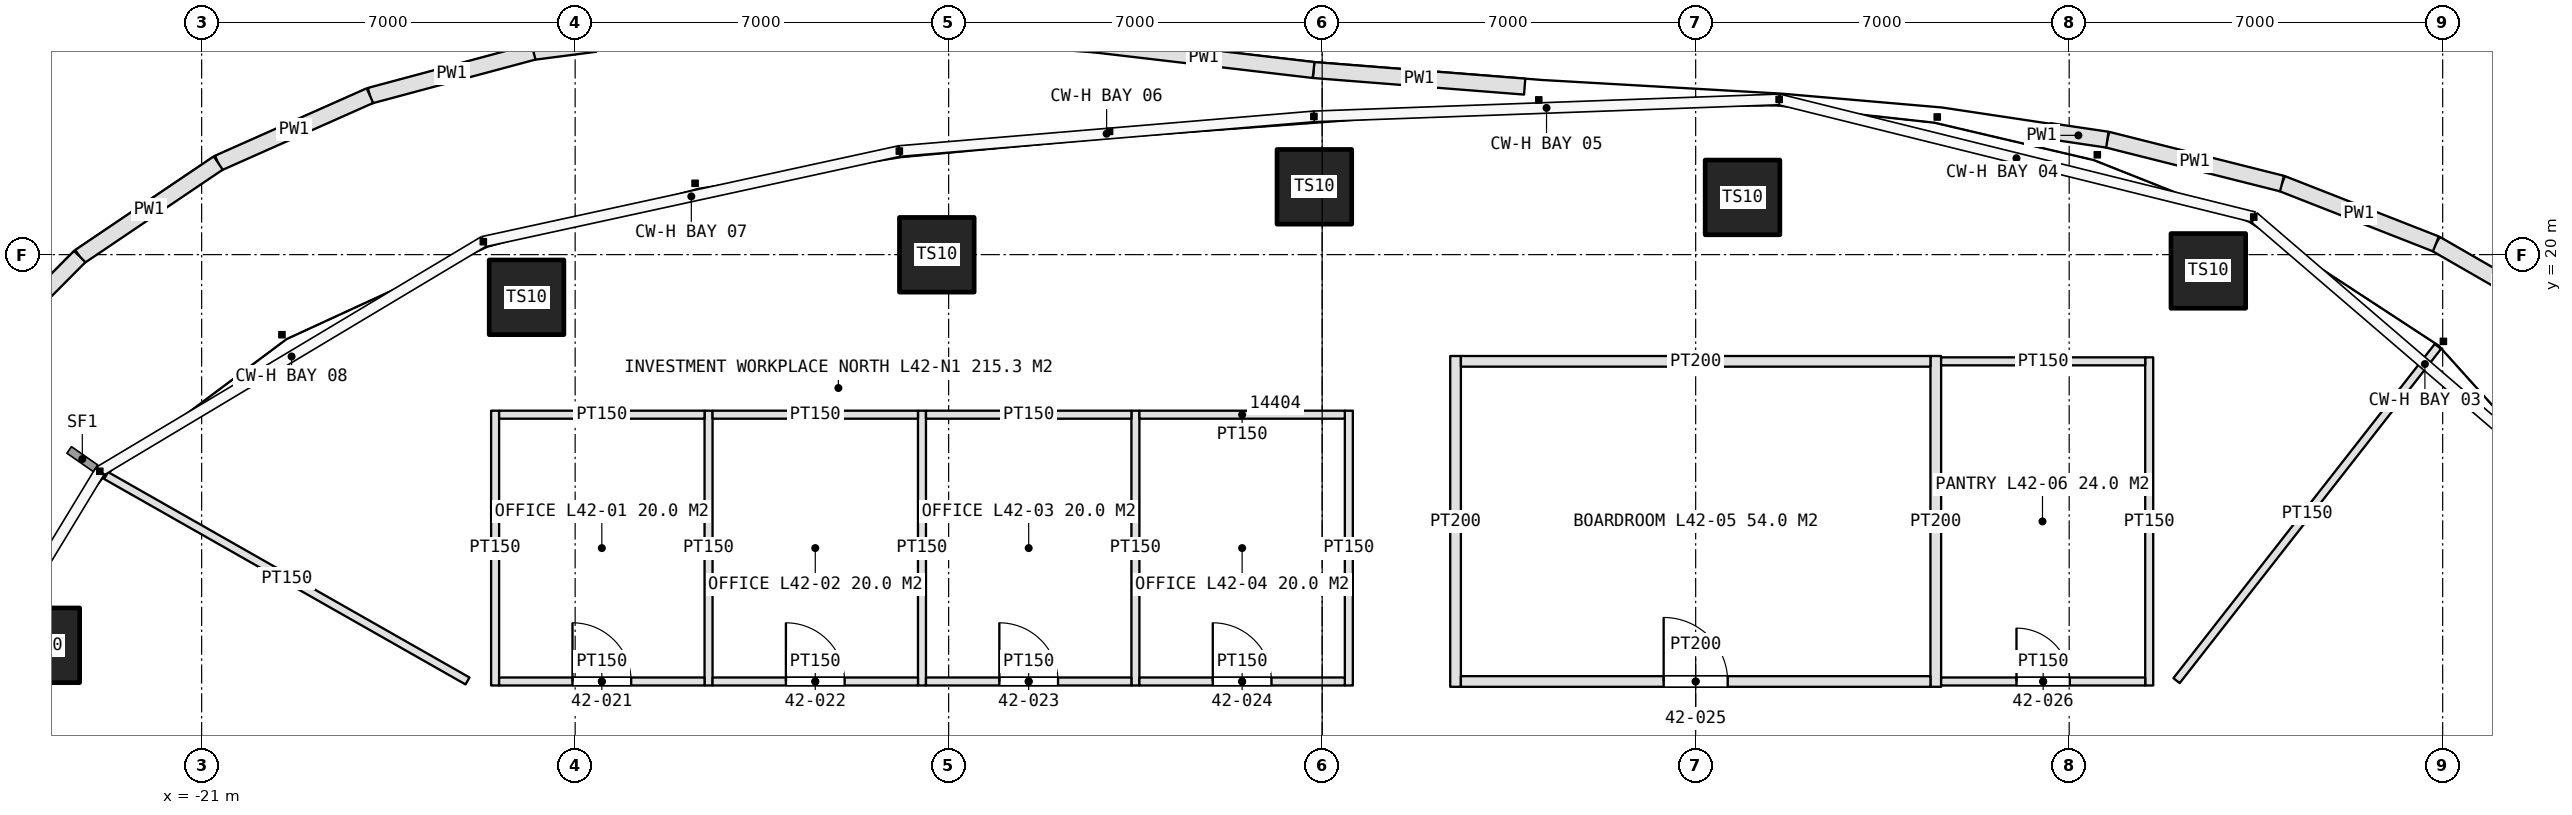
"""IFC4 building model, lengths in metres.
Left out: names, types, materials, properties, quantities, classifications, styles, units other than length and angle.
Written with IfcOpenShell. Run it as: python <this file> out.ifc"""

import sys

from ifc_helpers import new_model, si_unit, direction, frame, frame_2d, origin, origin_2d, place, context, subcontext, project, spatial, rectangle, hollow_rectangle, extrude, element, fill, save


model = new_model("IFC4")
c1 = context("Model", 3, precision=1e-05, world=origin(), true_north=direction((0.0, 1.0)))
c2 = subcontext(c1, "Body", "Model", "MODEL_VIEW")
j1 = project(units=[si_unit("LENGTHUNIT", "METRE"), si_unit("PLANEANGLEUNIT", "RADIAN")], contexts=[c1])
p1 = place(None, origin())
s1 = spatial("IfcSite", under=j1, at=p1, CompositionType="ELEMENT")
p2 = place(p1, origin())
s2 = spatial("IfcBuilding", under=s1, at=p2, CompositionType="ELEMENT")
p3 = place(p2, frame((0.0, 0.0, 194.8)))
s3 = spatial("IfcBuildingStorey", under=s2, at=p3, CompositionType="ELEMENT", Elevation=194.8)
for number, where, z_axis, x_axis in (
    (1, (16.608, 19.695, 0.0), (0.0, 0.0, 1.0), (1.0, 0.0, 0.0)),
    (2, (7.878, 21.072, 0.0), (0.0, 0.0, 1.0), (1.0, 0.0, 0.0)),
    (3, (-0.146, 21.271, 0.0), (0.0, 0.0, 1.0), (1.0, 0.0, 0.0)),
):
    element("IfcColumn", number, at=place(p3, frame(where, z_axis=z_axis, x_axis=x_axis)), inside=s3, PredefinedType="COLUMN", context=c2, shape_type="SweptSolid", body=[
        extrude(hollow_rectangle(XDim=1.4, YDim=1.4, WallThickness=0.15, at=origin_2d()), origin(), (0.0, 0.0, 1.0), 4.2),
    ])
for number, where, z_axis, x_axis in (
    (4, (-7.222, 19.997, 0.775), (0.0, 0.0, 1.0), (1.0, 0.0, 0.0)),
    (5, (-14.911, 19.2, 0.775), (0.0, 0.0, 1.0), (1.0, 0.0, 0.0)),
    (6, (-23.986, 12.678, 0.775), (0.0, 0.0, 1.0), (1.0, 0.0, 0.0)),
):
    element("IfcColumn", number, at=place(p3, frame(where, z_axis=z_axis, x_axis=x_axis)), inside=s3, PredefinedType="COLUMN", context=c2, shape_type="SweptSolid", body=[
        extrude(hollow_rectangle(XDim=1.4, YDim=1.4, WallThickness=0.15, at=origin_2d()), origin(), (0.0, 0.0, 1.0), 3.425),
    ])
p4 = place(p3, frame((23.61, 18.625, 0.0), z_axis=(0.0, 0.0, 1.0), x_axis=(-0.866607267142, 0.498990826105, 0.0)))
e7 = element("IfcWall", 7, at=p4, inside=s3, PredefinedType="PARAPET", context=c2, shape_type="SweptSolid", body=[
    extrude(rectangle(XDim=3.159, YDim=0.3, at=frame_2d((1.58, 0.0))), origin(), (0.0, 0.0, 1.0), 1.1),
])
p5 = place(p3, frame((20.872, 20.201, 0.0), z_axis=(0.0, 0.0, 1.0), x_axis=(-0.931057748711, 0.364871852251, 0.0)))
e8 = element("IfcWall", 8, at=p5, inside=s3, PredefinedType="PARAPET", context=c2, shape_type="SweptSolid", body=[
    extrude(rectangle(XDim=3.097, YDim=0.3, at=frame_2d((1.549, 0.0))), origin(), (0.0, 0.0, 1.0), 1.1),
])
p6 = place(p3, frame((17.988, 21.332, 0.0), z_axis=(0.0, 0.0, 1.0), x_axis=(-0.969792561097, 0.243931114129, 0.0)))
e9 = element("IfcWall", 9, at=p6, inside=s3, PredefinedType="PARAPET", context=c2, shape_type="SweptSolid", body=[
    extrude(rectangle(XDim=3.375, YDim=0.3, at=frame_2d((1.688, 0.0))), origin(), (0.0, 0.0, 1.0), 1.1),
])
p7 = place(p3, frame((14.715, 22.155, 0.0), z_axis=(0.0, 0.0, 1.0), x_axis=(-0.98921181545, 0.146492266603, 0.0)))
e10 = element("IfcWall", 10, at=p7, inside=s3, PredefinedType="PARAPET", context=c2, shape_type="SweptSolid", body=[
    extrude(rectangle(XDim=1.098, YDim=0.3, at=frame_2d((0.549, 0.0))), origin(), (0.0, 0.0, 1.0), 1.1),
])
p8 = place(p3, frame((3.795, 23.149, 0.0), z_axis=(0.0, 0.0, 1.0), x_axis=(-0.996928307618, 0.078319534411, 0.0)))
e11 = element("IfcWall", 11, at=p8, inside=s3, PredefinedType="PARAPET", context=c2, shape_type="SweptSolid", body=[
    extrude(rectangle(XDim=3.968, YDim=0.3, at=frame_2d((1.984, 0.0))), origin(), (0.0, 0.0, 1.0), 1.1),
])
p9 = place(p3, frame((-0.161, 23.46, 0.0), z_axis=(0.0, 0.0, 1.0), x_axis=(-0.993218413724, 0.11626341918, 0.0)))
e12 = element("IfcWall", 12, at=p9, inside=s3, PredefinedType="PARAPET", context=c2, shape_type="SweptSolid", body=[
    extrude(rectangle(XDim=4.143, YDim=0.3, at=frame_2d((2.072, 0.0))), origin(), (0.0, 0.0, 1.0), 1.1),
])
p10 = place(p3, frame((-4.276, 23.941, 0.0), z_axis=(0.0, 0.0, 1.0), x_axis=(-0.997435510339, 0.071570962797, 0.0)))
e13 = element("IfcWall", 13, at=p10, inside=s3, PredefinedType="PARAPET", context=c2, shape_type="SweptSolid", body=[
    extrude(rectangle(XDim=4.499, YDim=0.3, at=frame_2d((2.25, 0.0))), origin(), (0.0, 0.0, 1.0), 1.1),
])
p11 = place(p3, frame((-11.723, 24.197, 0.0), z_axis=(0.0, 0.0, 1.0), x_axis=(-0.991718761829, -0.128428569396, 0.0)))
e14 = element("IfcWall", 14, at=p11, inside=s3, PredefinedType="PARAPET", context=c2, shape_type="SweptSolid", body=[
    extrude(rectangle(XDim=3.083, YDim=0.3, at=frame_2d((1.542, 0.0))), origin(), (0.0, 0.0, 1.0), 1.1),
])
p12 = place(p3, frame((-14.781, 23.801, 0.0), z_axis=(0.0, 0.0, 1.0), x_axis=(-0.965884154767, -0.25897451529, 0.0)))
e15 = element("IfcWall", 15, at=p12, inside=s3, PredefinedType="PARAPET", context=c2, shape_type="SweptSolid", body=[
    extrude(rectangle(XDim=3.173, YDim=0.3, at=frame_2d((1.586, 0.0))), origin(), (0.0, 0.0, 1.0), 1.1),
])
p13 = place(p3, frame((-17.846, 22.979, 0.0), z_axis=(0.0, 0.0, 1.0), x_axis=(-0.913915081903, -0.405905436119, 0.0)))
e16 = element("IfcWall", 16, at=p13, inside=s3, PredefinedType="PARAPET", context=c2, shape_type="SweptSolid", body=[
    extrude(rectangle(XDim=3.111, YDim=0.3, at=frame_2d((1.555, 0.0))), origin(), (0.0, 0.0, 1.0), 1.1),
])
p14 = place(p3, frame((-20.689, 21.716, 0.0), z_axis=(0.0, 0.0, 1.0), x_axis=(-0.828713081968, -0.559673679723, 0.0)))
e17 = element("IfcWall", 17, at=p14, inside=s3, PredefinedType="PARAPET", context=c2, shape_type="SweptSolid", body=[
    extrude(rectangle(XDim=3.132, YDim=0.3, at=frame_2d((1.566, 0.0))), origin(), (0.0, 0.0, 1.0), 1.1),
])
p15 = place(p3, frame((-23.284, 19.964, 0.0), z_axis=(0.0, 0.0, 1.0), x_axis=(-0.705392023613, -0.708817390464, 0.0)))
e18 = element("IfcWall", 18, at=p15, inside=s3, PredefinedType="PARAPET", context=c2, shape_type="SweptSolid", body=[
    extrude(rectangle(XDim=3.136, YDim=0.3, at=frame_2d((1.568, 0.0))), origin(), (0.0, 0.0, 1.0), 1.1),
])
for number, where, z_axis, x_axis in (
    (19, (-15.5, 11.925, 0.0), (0.0, 0.0, 1.0), (0.0, 1.0, 0.0)),
    (20, (-11.5, 11.925, 0.0), (0.0, 0.0, 1.0), (0.0, 1.0, 0.0)),
    (21, (-7.5, 11.925, 0.0), (0.0, 0.0, 1.0), (0.0, 1.0, 0.0)),
    (22, (-3.5, 11.925, 0.0), (0.0, 0.0, 1.0), (0.0, 1.0, 0.0)),
    (23, (0.5, 11.925, 0.0), (0.0, 0.0, 1.0), (0.0, 1.0, 0.0)),
):
    element("IfcWall", number, at=place(p3, frame(where, z_axis=z_axis, x_axis=x_axis)), inside=s3, PredefinedType="PARTITIONING", context=c2, shape_type="SweptSolid", body=[
        extrude(rectangle(XDim=5.15, YDim=0.15, at=frame_2d((2.575, 0.0))), origin(), (0.0, 0.0, 1.0), 3.0),
    ])
p16 = place(p3, frame((-15.425, 12.0, 0.0), z_axis=(0.0, 0.0, 1.0), x_axis=(1.0, 0.0, 0.0)))
e24 = element("IfcWall", 24, at=p16, inside=s3, PredefinedType="PARTITIONING", context=c2, shape_type="SweptSolid", body=[
    extrude(rectangle(XDim=3.85, YDim=0.15, at=frame_2d((1.925, 0.0))), origin(), (0.0, 0.0, 1.0), 3.0),
])
p17 = place(p16, frame((1.375, 0.0, 0.0)))
e25 = element("IfcOpeningElement", 25, at=p17, cuts=e24, PredefinedType="OPENING", context=c2, shape_type="SweptSolid", body=[
    extrude(rectangle(XDim=1.1, YDim=2.3, at=frame_2d((0.55, 1.15))), frame((0.0, 0.085, 0.0), z_axis=(0.0, -1.0, 0.0), x_axis=(1.0, 0.0, 0.0)), (0.0, 0.0, 1.0), 0.17),
])
p18 = place(p3, frame((-15.425, 17.0, 0.0), z_axis=(0.0, 0.0, 1.0), x_axis=(1.0, 0.0, 0.0)))
e26 = element("IfcWall", 26, at=p18, inside=s3, PredefinedType="PARTITIONING", context=c2, shape_type="SweptSolid", body=[
    extrude(rectangle(XDim=3.85, YDim=0.15, at=frame_2d((1.925, 0.0))), origin(), (0.0, 0.0, 1.0), 3.0),
])
p19 = place(p3, frame((-11.425, 12.0, 0.0), z_axis=(0.0, 0.0, 1.0), x_axis=(1.0, 0.0, 0.0)))
e27 = element("IfcWall", 27, at=p19, inside=s3, PredefinedType="PARTITIONING", context=c2, shape_type="SweptSolid", body=[
    extrude(rectangle(XDim=3.85, YDim=0.15, at=frame_2d((1.925, 0.0))), origin(), (0.0, 0.0, 1.0), 3.0),
])
p20 = place(p19, frame((1.375, 0.0, 0.0)))
e28 = element("IfcOpeningElement", 28, at=p20, cuts=e27, PredefinedType="OPENING", context=c2, shape_type="SweptSolid", body=[
    extrude(rectangle(XDim=1.1, YDim=2.3, at=frame_2d((0.55, 1.15))), frame((0.0, 0.085, 0.0), z_axis=(0.0, -1.0, 0.0), x_axis=(1.0, 0.0, 0.0)), (0.0, 0.0, 1.0), 0.17),
])
p21 = place(p3, frame((-11.425, 17.0, 0.0), z_axis=(0.0, 0.0, 1.0), x_axis=(1.0, 0.0, 0.0)))
e29 = element("IfcWall", 29, at=p21, inside=s3, PredefinedType="PARTITIONING", context=c2, shape_type="SweptSolid", body=[
    extrude(rectangle(XDim=3.85, YDim=0.15, at=frame_2d((1.925, 0.0))), origin(), (0.0, 0.0, 1.0), 3.0),
])
p22 = place(p3, frame((-7.425, 12.0, 0.0), z_axis=(0.0, 0.0, 1.0), x_axis=(1.0, 0.0, 0.0)))
e30 = element("IfcWall", 30, at=p22, inside=s3, PredefinedType="PARTITIONING", context=c2, shape_type="SweptSolid", body=[
    extrude(rectangle(XDim=3.85, YDim=0.15, at=frame_2d((1.925, 0.0))), origin(), (0.0, 0.0, 1.0), 3.0),
])
p23 = place(p22, frame((1.375, 0.0, 0.0)))
e31 = element("IfcOpeningElement", 31, at=p23, cuts=e30, PredefinedType="OPENING", context=c2, shape_type="SweptSolid", body=[
    extrude(rectangle(XDim=1.1, YDim=2.3, at=frame_2d((0.55, 1.15))), frame((0.0, 0.085, 0.0), z_axis=(0.0, -1.0, 0.0), x_axis=(1.0, 0.0, 0.0)), (0.0, 0.0, 1.0), 0.17),
])
p24 = place(p3, frame((-7.425, 17.0, 0.0), z_axis=(0.0, 0.0, 1.0), x_axis=(1.0, 0.0, 0.0)))
e32 = element("IfcWall", 32, at=p24, inside=s3, PredefinedType="PARTITIONING", context=c2, shape_type="SweptSolid", body=[
    extrude(rectangle(XDim=3.85, YDim=0.15, at=frame_2d((1.925, 0.0))), origin(), (0.0, 0.0, 1.0), 3.0),
])
p25 = place(p3, frame((-3.425, 12.0, 0.0), z_axis=(0.0, 0.0, 1.0), x_axis=(1.0, 0.0, 0.0)))
e33 = element("IfcWall", 33, at=p25, inside=s3, PredefinedType="PARTITIONING", context=c2, shape_type="SweptSolid", body=[
    extrude(rectangle(XDim=3.85, YDim=0.15, at=frame_2d((1.925, 0.0))), origin(), (0.0, 0.0, 1.0), 3.0),
])
p26 = place(p25, frame((1.375, 0.0, 0.0)))
e34 = element("IfcOpeningElement", 34, at=p26, cuts=e33, PredefinedType="OPENING", context=c2, shape_type="SweptSolid", body=[
    extrude(rectangle(XDim=1.1, YDim=2.3, at=frame_2d((0.55, 1.15))), frame((0.0, 0.085, 0.0), z_axis=(0.0, -1.0, 0.0), x_axis=(1.0, 0.0, 0.0)), (0.0, 0.0, 1.0), 0.17),
])
p27 = place(p3, frame((-3.425, 17.0, 0.0), z_axis=(0.0, 0.0, 1.0), x_axis=(1.0, 0.0, 0.0)))
e35 = element("IfcWall", 35, at=p27, inside=s3, PredefinedType="PARTITIONING", context=c2, shape_type="SweptSolid", body=[
    extrude(rectangle(XDim=3.85, YDim=0.15, at=frame_2d((1.925, 0.0))), origin(), (0.0, 0.0, 1.0), 3.0),
])
for number, where, z_axis, x_axis in (
    (36, (2.5, 11.9, 0.0), (0.0, 0.0, 1.0), (0.0, 1.0, 0.0)),
    (37, (11.5, 11.9, 0.0), (0.0, 0.0, 1.0), (0.0, 1.0, 0.0)),
):
    element("IfcWall", number, at=place(p3, frame(where, z_axis=z_axis, x_axis=x_axis)), inside=s3, PredefinedType="PARTITIONING", context=c2, shape_type="SweptSolid", body=[
        extrude(rectangle(XDim=6.2, YDim=0.2, at=frame_2d((3.1, 0.0))), origin(), (0.0, 0.0, 1.0), 3.0),
    ])
p28 = place(p3, frame((15.5, 11.925, 0.0), z_axis=(0.0, 0.0, 1.0), x_axis=(0.0, 1.0, 0.0)))
e38 = element("IfcWall", 38, at=p28, inside=s3, PredefinedType="PARTITIONING", context=c2, shape_type="SweptSolid", body=[
    extrude(rectangle(XDim=6.15, YDim=0.15, at=frame_2d((3.075, 0.0))), origin(), (0.0, 0.0, 1.0), 3.0),
])
p29 = place(p3, frame((2.6, 12.0, 0.0), z_axis=(0.0, 0.0, 1.0), x_axis=(1.0, 0.0, 0.0)))
e39 = element("IfcWall", 39, at=p29, inside=s3, PredefinedType="PARTITIONING", context=c2, shape_type="SweptSolid", body=[
    extrude(rectangle(XDim=8.8, YDim=0.2, at=frame_2d((4.4, 0.0))), origin(), (0.0, 0.0, 1.0), 3.0),
])
p30 = place(p29, frame((3.8, 0.0, 0.0)))
e40 = element("IfcOpeningElement", 40, at=p30, cuts=e39, PredefinedType="OPENING", context=c2, shape_type="SweptSolid", body=[
    extrude(rectangle(XDim=1.2, YDim=2.4, at=frame_2d((0.6, 1.2))), frame((0.0, 0.11, 0.0), z_axis=(0.0, -1.0, 0.0), x_axis=(1.0, 0.0, 0.0)), (0.0, 0.0, 1.0), 0.22),
])
p31 = place(p3, frame((2.6, 18.0, 0.0), z_axis=(0.0, 0.0, 1.0), x_axis=(1.0, 0.0, 0.0)))
e41 = element("IfcWall", 41, at=p31, inside=s3, PredefinedType="PARTITIONING", context=c2, shape_type="SweptSolid", body=[
    extrude(rectangle(XDim=8.8, YDim=0.2, at=frame_2d((4.4, 0.0))), origin(), (0.0, 0.0, 1.0), 3.0),
])
p32 = place(p3, frame((11.6, 12.0, 0.0), z_axis=(0.0, 0.0, 1.0), x_axis=(1.0, 0.0, 0.0)))
e42 = element("IfcWall", 42, at=p32, inside=s3, PredefinedType="PARTITIONING", context=c2, shape_type="SweptSolid", body=[
    extrude(rectangle(XDim=3.825, YDim=0.15, at=frame_2d((1.913, 0.0))), origin(), (0.0, 0.0, 1.0), 3.0),
])
p33 = place(p32, frame((1.413, 0.0, 0.0)))
e43 = element("IfcOpeningElement", 43, at=p33, cuts=e42, PredefinedType="OPENING", context=c2, shape_type="SweptSolid", body=[
    extrude(rectangle(XDim=1.0, YDim=2.2, at=frame_2d((0.5, 1.1))), frame((0.0, 0.085, 0.0), z_axis=(0.0, -1.0, 0.0), x_axis=(1.0, 0.0, 0.0)), (0.0, 0.0, 1.0), 0.17),
])
p34 = place(p3, frame((11.6, 18.0, 0.0), z_axis=(0.0, 0.0, 1.0), x_axis=(1.0, 0.0, 0.0)))
e44 = element("IfcWall", 44, at=p34, inside=s3, PredefinedType="PARTITIONING", context=c2, shape_type="SweptSolid", body=[
    extrude(rectangle(XDim=3.825, YDim=0.15, at=frame_2d((1.913, 0.0))), origin(), (0.0, 0.0, 1.0), 3.0),
])
p35 = place(p3, frame((-16.017, 12.01, 0.0), z_axis=(0.0, 0.0, 1.0), x_axis=(-0.869357432803, 0.494183826151, 0.0)))
e45 = element("IfcWall", 45, at=p35, inside=s3, PredefinedType="PARTITIONING", context=c2, shape_type="SweptSolid", body=[
    extrude(rectangle(XDim=7.791, YDim=0.15, at=frame_2d((3.896, 0.0))), origin(), (0.0, 0.0, 1.0), 3.0),
])
p36 = place(p3, frame((16.012, 12.016, 0.0), z_axis=(0.0, 0.0, 1.0), x_axis=(0.616030058222, 0.787722646219, 0.0)))
e46 = element("IfcWall", 46, at=p36, inside=s3, PredefinedType="PARTITIONING", context=c2, shape_type="SweptSolid", body=[
    extrude(rectangle(XDim=7.952, YDim=0.15, at=frame_2d((3.976, 0.0))), origin(), (0.0, 0.0, 1.0), 3.0),
])
p37 = place(p17, origin())
e47 = element("IfcDoor", 47, at=p37, inside=s3, OperationType="SINGLE_SWING_LEFT", PredefinedType="DOOR", context=c2, shape_type="SweptSolid", body=[
    extrude(rectangle(XDim=1.1, YDim=2.3, at=frame_2d((0.55, 1.15))), frame((0.0, 0.025, 0.0), z_axis=(0.0, -1.0, 0.0), x_axis=(1.0, 0.0, 0.0)), (0.0, 0.0, 1.0), 0.05),
])
fill(e25, e47)
p38 = place(p20, origin())
e48 = element("IfcDoor", 48, at=p38, inside=s3, OperationType="SINGLE_SWING_LEFT", PredefinedType="DOOR", context=c2, shape_type="SweptSolid", body=[
    extrude(rectangle(XDim=1.1, YDim=2.3, at=frame_2d((0.55, 1.15))), frame((0.0, 0.025, 0.0), z_axis=(0.0, -1.0, 0.0), x_axis=(1.0, 0.0, 0.0)), (0.0, 0.0, 1.0), 0.05),
])
fill(e28, e48)
p39 = place(p23, origin())
e49 = element("IfcDoor", 49, at=p39, inside=s3, OperationType="SINGLE_SWING_LEFT", PredefinedType="DOOR", context=c2, shape_type="SweptSolid", body=[
    extrude(rectangle(XDim=1.1, YDim=2.3, at=frame_2d((0.55, 1.15))), frame((0.0, 0.025, 0.0), z_axis=(0.0, -1.0, 0.0), x_axis=(1.0, 0.0, 0.0)), (0.0, 0.0, 1.0), 0.05),
])
fill(e31, e49)
p40 = place(p26, origin())
e50 = element("IfcDoor", 50, at=p40, inside=s3, OperationType="SINGLE_SWING_LEFT", PredefinedType="DOOR", context=c2, shape_type="SweptSolid", body=[
    extrude(rectangle(XDim=1.1, YDim=2.3, at=frame_2d((0.55, 1.15))), frame((0.0, 0.025, 0.0), z_axis=(0.0, -1.0, 0.0), x_axis=(1.0, 0.0, 0.0)), (0.0, 0.0, 1.0), 0.05),
])
fill(e34, e50)
p41 = place(p30, origin())
e51 = element("IfcDoor", 51, at=p41, inside=s3, OperationType="SINGLE_SWING_LEFT", PredefinedType="DOOR", context=c2, shape_type="SweptSolid", body=[
    extrude(rectangle(XDim=1.2, YDim=2.4, at=frame_2d((0.6, 1.2))), frame((0.0, 0.025, 0.0), z_axis=(0.0, -1.0, 0.0), x_axis=(1.0, 0.0, 0.0)), (0.0, 0.0, 1.0), 0.05),
])
fill(e40, e51)
p42 = place(p33, origin())
e52 = element("IfcDoor", 52, at=p42, inside=s3, OperationType="SINGLE_SWING_LEFT", PredefinedType="DOOR", context=c2, shape_type="SweptSolid", body=[
    extrude(rectangle(XDim=1.0, YDim=2.2, at=frame_2d((0.5, 1.1))), frame((0.0, 0.025, 0.0), z_axis=(0.0, -1.0, 0.0), x_axis=(1.0, 0.0, 0.0)), (0.0, 0.0, 1.0), 0.05),
])
fill(e43, e52)
save(model, sys.argv[1])
